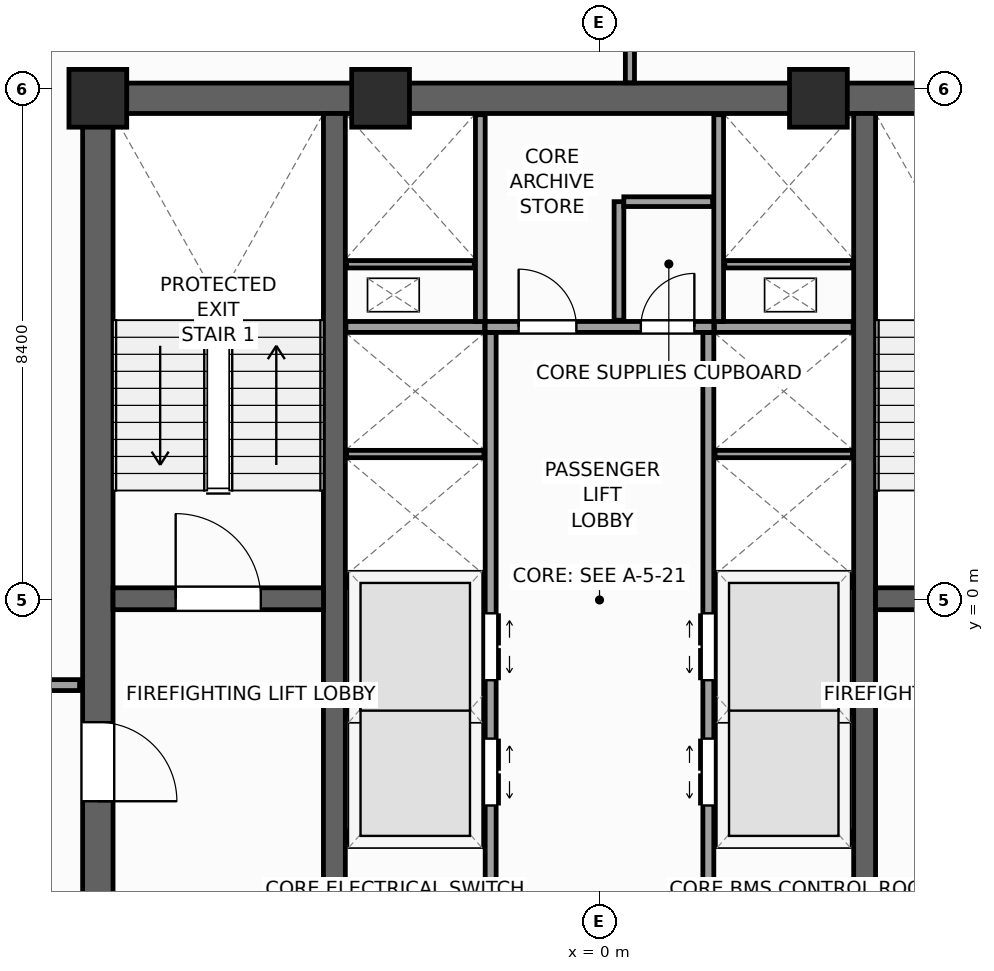
"""IFC4 building model, lengths in metres.
Left out: names, types, materials, properties, quantities, classifications, styles, units other than length and angle.
Written with IfcOpenShell. Run it as: python <this file> out.ifc"""

import sys

from ifc_helpers import new_model, si_unit, direction, frame, frame_2d, origin, origin_2d, place, context, subcontext, project, spatial, rectangle, extrude, source, transform, mapped, element, fill, save


model = new_model("IFC4")
c1 = context("Model", 3, precision=1e-05, world=origin(), true_north=direction((0.0, 1.0)))
c2 = subcontext(c1, "Body", "Model", "MODEL_VIEW")
j1 = project(units=[si_unit("LENGTHUNIT", "METRE"), si_unit("PLANEANGLEUNIT", "RADIAN")], contexts=[c1])
p1 = place(None, origin())
s1 = spatial("IfcSite", under=j1, at=p1, CompositionType="ELEMENT")
p2 = place(p1, origin())
s2 = spatial("IfcBuilding", under=s1, at=p2, CompositionType="ELEMENT")
p3 = place(p2, frame((0.0, 0.0, 213.4)))
s3 = spatial("IfcBuildingStorey", under=s2, at=p3, CompositionType="ELEMENT", Elevation=213.4)
p4 = place(p3, frame((-8.5, 8.25, 0.0), z_axis=(0.0, 0.0, 1.0), x_axis=(1.0, 0.0, 0.0)))
e1 = element("IfcWall", 1, at=p4, inside=s3, PredefinedType="SHEAR", context=c2, shape_type="SweptSolid", body=[
    extrude(rectangle(XDim=17.0, YDim=0.5, at=frame_2d((8.5, 0.0))), origin(), (0.0, 0.0, 1.0), 3.9),
])
p5 = place(p3, frame((-8.25, -8.0, 0.0), z_axis=(0.0, 0.0, 1.0), x_axis=(0.0, 1.0, 0.0)))
e2 = element("IfcWall", 2, at=p5, inside=s3, PredefinedType="SHEAR", context=c2, shape_type="SweptSolid", body=[
    extrude(rectangle(XDim=16.0, YDim=0.5, at=frame_2d((8.0, 0.0))), origin(), (0.0, 0.0, 1.0), 3.9),
])
p6 = place(p5, frame((4.69, 0.0, 0.0)))
e3 = element("IfcOpeningElement", 3, at=p6, cuts=e2, PredefinedType="OPENING", context=c2, shape_type="SweptSolid", body=[
    extrude(rectangle(XDim=1.3, YDim=2.2, at=frame_2d((0.65, 1.1))), frame((0.0, 0.26, 0.0), z_axis=(0.0, -1.0, 0.0), x_axis=(1.0, 0.0, 0.0)), (0.0, 0.0, 1.0), 0.52),
])
for number, where, z_axis, x_axis in (
    (4, (-4.36, -8.0, 0.0), (0.0, 0.0, 1.0), (0.0, 1.0, 0.0)),
    (5, (4.36, -8.0, 0.0), (0.0, 0.0, 1.0), (0.0, 1.0, 0.0)),
):
    element("IfcWall", number, at=place(p3, frame(where, z_axis=z_axis, x_axis=x_axis)), inside=s3, PredefinedType="SHEAR", context=c2, shape_type="SweptSolid", body=[
        extrude(rectangle(XDim=16.0, YDim=0.36, at=frame_2d((8.0, 0.0))), origin(), (0.0, 0.0, 1.0), 3.9),
    ])
p7 = place(p3, frame((-8.0, 0.02, 0.0), z_axis=(0.0, 0.0, 1.0), x_axis=(1.0, 0.0, 0.0)))
e6 = element("IfcWall", 6, at=p7, inside=s3, PredefinedType="SHEAR", context=c2, shape_type="SweptSolid", body=[
    extrude(rectangle(XDim=3.46, YDim=0.36, at=frame_2d((1.73, 0.0))), origin(), (0.0, 0.0, 1.0), 3.9),
])
p8 = place(p7, frame((1.03, 0.0, 0.0)))
e7 = element("IfcOpeningElement", 7, at=p8, cuts=e6, PredefinedType="OPENING", context=c2, shape_type="SweptSolid", body=[
    extrude(rectangle(XDim=1.4, YDim=2.2, at=frame_2d((0.7, 1.1))), frame((0.0, 0.19, 0.0), z_axis=(0.0, -1.0, 0.0), x_axis=(1.0, 0.0, 0.0)), (0.0, 0.0, 1.0), 0.38),
])
p9 = place(p3, frame((4.54, 0.02, 0.0), z_axis=(0.0, 0.0, 1.0), x_axis=(1.0, 0.0, 0.0)))
e8 = element("IfcWall", 8, at=p9, inside=s3, PredefinedType="SHEAR", context=c2, shape_type="SweptSolid", body=[
    extrude(rectangle(XDim=3.46, YDim=0.36, at=frame_2d((1.73, 0.0))), origin(), (0.0, 0.0, 1.0), 3.9),
])
p10 = place(p9, frame((1.03, 0.0, 0.0)))
e9 = element("IfcOpeningElement", 9, at=p10, cuts=e8, PredefinedType="OPENING", context=c2, shape_type="SweptSolid", body=[
    extrude(rectangle(XDim=1.4, YDim=2.2, at=frame_2d((0.7, 1.1))), frame((0.0, 0.19, 0.0), z_axis=(0.0, -1.0, 0.0), x_axis=(1.0, 0.0, 0.0)), (0.0, 0.0, 1.0), 0.38),
])
m1 = source(origin(), c2, "Body", "SweptSolid", [
    extrude(rectangle(XDim=0.95, YDim=0.95, at=origin_2d()), origin(), (0.0, 0.0, 1.0), 3.9),
])
for number, where, z_axis, x_axis in (
    (10, (-8.25, 8.25, 0.0), (0.0, 0.0, 1.0), (1.0, 0.0, 0.0)),
    (11, (-3.6, 8.25, 0.0), (0.0, 0.0, 1.0), (1.0, 0.0, 0.0)),
    (12, (3.6, 8.25, 0.0), (0.0, 0.0, 1.0), (1.0, 0.0, 0.0)),
):
    element("IfcColumn", number, at=place(p3, frame(where, z_axis=z_axis, x_axis=x_axis)), inside=s3, PredefinedType="PILASTER", context=c2, shape_type="MappedRepresentation", body=[
        mapped(m1, transform((0.0, 0.0, 0.0), scale=1.0)),
    ])
p11 = place(p3, frame((29.154, 6.733, 0.0), z_axis=(0.0, 0.0, 1.0), x_axis=(-0.77714192302, 0.629325378072, 0.0)))
e13 = element("IfcWall", 13, at=p11, inside=s3, PredefinedType="STANDARD", context=c2, shape_type="SweptSolid", body=[
    extrude(rectangle(XDim=36.84, YDim=0.34, at=frame_2d((18.42, 0.0))), origin(), (0.0, 0.0, 1.0), 2.96),
])
p12 = place(p11, frame((3.721, 0.0, 0.48)))
e14 = element("IfcOpeningElement", 14, at=p12, cuts=e13, PredefinedType="OPENING", context=c2, shape_type="SweptSolid", body=[
    extrude(rectangle(XDim=1.4, YDim=2.4, at=frame_2d((0.7, 1.2))), frame((0.0, 0.18, 0.0), z_axis=(0.0, -1.0, 0.0), x_axis=(1.0, 0.0, 0.0)), (0.0, 0.0, 1.0), 0.36),
])
p13 = place(p11, frame((9.809, 0.0, 0.58)))
e15 = element("IfcOpeningElement", 15, at=p13, cuts=e13, PredefinedType="OPENING", context=c2, shape_type="SweptSolid", body=[
    extrude(rectangle(XDim=1.75, YDim=2.3, at=frame_2d((0.875, 1.15))), frame((0.0, 0.18, 0.0), z_axis=(0.0, -1.0, 0.0), x_axis=(1.0, 0.0, 0.0)), (0.0, 0.0, 1.0), 0.36),
])
p14 = place(p11, frame((16.058, 0.0, 0.58)))
e16 = element("IfcOpeningElement", 16, at=p14, cuts=e13, PredefinedType="OPENING", context=c2, shape_type="SweptSolid", body=[
    extrude(rectangle(XDim=1.75, YDim=2.3, at=frame_2d((0.875, 1.15))), frame((0.0, 0.18, 0.0), z_axis=(0.0, -1.0, 0.0), x_axis=(1.0, 0.0, 0.0)), (0.0, 0.0, 1.0), 0.36),
])
p15 = place(p11, frame((24.176, 0.0, 0.58)))
e17 = element("IfcOpeningElement", 17, at=p15, cuts=e13, PredefinedType="OPENING", context=c2, shape_type="SweptSolid", body=[
    extrude(rectangle(XDim=1.75, YDim=2.3, at=frame_2d((0.875, 1.15))), frame((0.0, 0.18, 0.0), z_axis=(0.0, -1.0, 0.0), x_axis=(1.0, 0.0, 0.0)), (0.0, 0.0, 1.0), 0.36),
])
p16 = place(p11, frame((30.982, 0.0, 0.48)))
e18 = element("IfcOpeningElement", 18, at=p16, cuts=e13, PredefinedType="OPENING", context=c2, shape_type="SweptSolid", body=[
    extrude(rectangle(XDim=1.4, YDim=2.4, at=frame_2d((0.7, 1.2))), frame((0.0, 0.18, 0.0), z_axis=(0.0, -1.0, 0.0), x_axis=(1.0, 0.0, 0.0)), (0.0, 0.0, 1.0), 0.36),
])
p17 = place(p3, frame((-6.733, 29.154, 0.0), z_axis=(0.0, 0.0, 1.0), x_axis=(-0.629325378072, -0.77714192302, 0.0)))
e19 = element("IfcWall", 19, at=p17, inside=s3, PredefinedType="STANDARD", context=c2, shape_type="SweptSolid", body=[
    extrude(rectangle(XDim=36.84, YDim=0.34, at=frame_2d((18.42, 0.0))), origin(), (0.0, 0.0, 1.0), 2.96),
])
p18 = place(p17, frame((12.295, 0.0, 0.0)))
e20 = element("IfcOpeningElement", 20, at=p18, cuts=e19, PredefinedType="OPENING", context=c2, shape_type="SweptSolid", body=[
    extrude(rectangle(XDim=1.05, YDim=2.25, at=frame_2d((0.525, 1.125))), frame((0.0, 0.18, 0.0), z_axis=(0.0, -1.0, 0.0), x_axis=(1.0, 0.0, 0.0)), (0.0, 0.0, 1.0), 0.36),
])
p19 = place(p17, frame((3.721, 0.0, 0.48)))
e21 = element("IfcOpeningElement", 21, at=p19, cuts=e19, PredefinedType="OPENING", context=c2, shape_type="SweptSolid", body=[
    extrude(rectangle(XDim=1.4, YDim=2.4, at=frame_2d((0.7, 1.2))), frame((0.0, 0.18, 0.0), z_axis=(0.0, -1.0, 0.0), x_axis=(1.0, 0.0, 0.0)), (0.0, 0.0, 1.0), 0.36),
])
p20 = place(p17, frame((9.059, 0.0, 0.58)))
e22 = element("IfcOpeningElement", 22, at=p20, cuts=e19, PredefinedType="OPENING", context=c2, shape_type="SweptSolid", body=[
    extrude(rectangle(XDim=1.75, YDim=2.3, at=frame_2d((0.875, 1.15))), frame((0.0, 0.18, 0.0), z_axis=(0.0, -1.0, 0.0), x_axis=(1.0, 0.0, 0.0)), (0.0, 0.0, 1.0), 0.36),
])
p21 = place(p17, frame((16.058, 0.0, 0.58)))
e23 = element("IfcOpeningElement", 23, at=p21, cuts=e19, PredefinedType="OPENING", context=c2, shape_type="SweptSolid", body=[
    extrude(rectangle(XDim=1.75, YDim=2.3, at=frame_2d((0.875, 1.15))), frame((0.0, 0.18, 0.0), z_axis=(0.0, -1.0, 0.0), x_axis=(1.0, 0.0, 0.0)), (0.0, 0.0, 1.0), 0.36),
])
p22 = place(p17, frame((24.176, 0.0, 0.58)))
e24 = element("IfcOpeningElement", 24, at=p22, cuts=e19, PredefinedType="OPENING", context=c2, shape_type="SweptSolid", body=[
    extrude(rectangle(XDim=1.75, YDim=2.3, at=frame_2d((0.875, 1.15))), frame((0.0, 0.18, 0.0), z_axis=(0.0, -1.0, 0.0), x_axis=(1.0, 0.0, 0.0)), (0.0, 0.0, 1.0), 0.36),
])
p23 = place(p17, frame((30.982, 0.0, 0.48)))
e25 = element("IfcOpeningElement", 25, at=p23, cuts=e19, PredefinedType="OPENING", context=c2, shape_type="SweptSolid", body=[
    extrude(rectangle(XDim=1.4, YDim=2.4, at=frame_2d((0.7, 1.2))), frame((0.0, 0.18, 0.0), z_axis=(0.0, -1.0, 0.0), x_axis=(1.0, 0.0, 0.0)), (0.0, 0.0, 1.0), 0.36),
])
p24 = place(p3, frame((-1.79, -7.98, 0.0), z_axis=(0.0, 0.0, 1.0), x_axis=(0.0, 1.0, 0.0)))
e26 = element("IfcWall", 26, at=p24, inside=s3, PredefinedType="PARTITIONING", context=c2, shape_type="SweptSolid", body=[
    extrude(rectangle(XDim=12.38, YDim=0.18, at=frame_2d((6.19, 0.0))), origin(), (0.0, 0.0, 1.0), 3.66),
])
p25 = place(p24, frame((4.6, 0.0, 0.0)))
e27 = element("IfcOpeningElement", 27, at=p25, cuts=e26, PredefinedType="OPENING", context=c2, shape_type="SweptSolid", body=[
    extrude(rectangle(XDim=1.1, YDim=2.2, at=frame_2d((0.55, 1.1))), frame((0.0, 0.1, 0.0), z_axis=(0.0, -1.0, 0.0), x_axis=(1.0, 0.0, 0.0)), (0.0, 0.0, 1.0), 0.2),
])
p26 = place(p24, frame((6.66, 0.0, 0.0)))
e28 = element("IfcOpeningElement", 28, at=p26, cuts=e26, PredefinedType="OPENING", context=c2, shape_type="SweptSolid", body=[
    extrude(rectangle(XDim=1.1, YDim=2.2, at=frame_2d((0.55, 1.1))), frame((0.0, 0.1, 0.0), z_axis=(0.0, -1.0, 0.0), x_axis=(1.0, 0.0, 0.0)), (0.0, 0.0, 1.0), 0.2),
])
p27 = place(p24, frame((1.4, 0.0, 0.0)))
e29 = element("IfcOpeningElement", 29, at=p27, cuts=e26, PredefinedType="OPENING", context=c2, shape_type="SweptSolid", body=[
    extrude(rectangle(XDim=1.15, YDim=2.25, at=frame_2d((0.575, 1.125))), frame((0.0, 0.1, 0.0), z_axis=(0.0, -1.0, 0.0), x_axis=(1.0, 0.0, 0.0)), (0.0, 0.0, 1.0), 0.2),
])
p28 = place(p3, frame((1.79, -7.98, 0.0), z_axis=(0.0, 0.0, 1.0), x_axis=(0.0, 1.0, 0.0)))
e30 = element("IfcWall", 30, at=p28, inside=s3, PredefinedType="PARTITIONING", context=c2, shape_type="SweptSolid", body=[
    extrude(rectangle(XDim=12.38, YDim=0.18, at=frame_2d((6.19, 0.0))), origin(), (0.0, 0.0, 1.0), 3.66),
])
p29 = place(p28, frame((4.6, 0.0, 0.0)))
e31 = element("IfcOpeningElement", 31, at=p29, cuts=e30, PredefinedType="OPENING", context=c2, shape_type="SweptSolid", body=[
    extrude(rectangle(XDim=1.1, YDim=2.2, at=frame_2d((0.55, 1.1))), frame((0.0, 0.1, 0.0), z_axis=(0.0, -1.0, 0.0), x_axis=(1.0, 0.0, 0.0)), (0.0, 0.0, 1.0), 0.2),
])
p30 = place(p28, frame((6.66, 0.0, 0.0)))
e32 = element("IfcOpeningElement", 32, at=p30, cuts=e30, PredefinedType="OPENING", context=c2, shape_type="SweptSolid", body=[
    extrude(rectangle(XDim=1.1, YDim=2.2, at=frame_2d((0.55, 1.1))), frame((0.0, 0.1, 0.0), z_axis=(0.0, -1.0, 0.0), x_axis=(1.0, 0.0, 0.0)), (0.0, 0.0, 1.0), 0.2),
])
p31 = place(p28, frame((1.4, 0.0, 0.0)))
e33 = element("IfcOpeningElement", 33, at=p31, cuts=e30, PredefinedType="OPENING", context=c2, shape_type="SweptSolid", body=[
    extrude(rectangle(XDim=1.15, YDim=2.25, at=frame_2d((0.575, 1.125))), frame((0.0, 0.1, 0.0), z_axis=(0.0, -1.0, 0.0), x_axis=(1.0, 0.0, 0.0)), (0.0, 0.0, 1.0), 0.2),
])
p32 = place(p3, frame((-1.88, 4.49, 0.0), z_axis=(0.0, 0.0, 1.0), x_axis=(1.0, 0.0, 0.0)))
e34 = element("IfcWall", 34, at=p32, inside=s3, PredefinedType="PARTITIONING", context=c2, shape_type="SweptSolid", body=[
    extrude(rectangle(XDim=3.76, YDim=0.18, at=frame_2d((1.88, 0.0))), origin(), (0.0, 0.0, 1.0), 3.66),
])
p33 = place(p32, frame((0.55, 0.0, 0.0)))
e35 = element("IfcOpeningElement", 35, at=p33, cuts=e34, PredefinedType="OPENING", context=c2, shape_type="SweptSolid", body=[
    extrude(rectangle(XDim=0.95, YDim=2.1, at=frame_2d((0.475, 1.05))), frame((0.0, 0.1, 0.0), z_axis=(0.0, -1.0, 0.0), x_axis=(1.0, 0.0, 0.0)), (0.0, 0.0, 1.0), 0.2),
])
p34 = place(p32, frame((2.56, 0.0, 0.0)))
e36 = element("IfcOpeningElement", 36, at=p34, cuts=e34, PredefinedType="OPENING", context=c2, shape_type="SweptSolid", body=[
    extrude(rectangle(XDim=0.88, YDim=2.1, at=frame_2d((0.44, 1.05))), frame((0.0, 0.1, 0.0), z_axis=(0.0, -1.0, 0.0), x_axis=(1.0, 0.0, 0.0)), (0.0, 0.0, 1.0), 0.2),
])
for number, where, z_axis, x_axis in (
    (37, (-4.17, -3.9, 0.0), (0.0, 0.0, 1.0), (1.0, 0.0, 0.0)),
    (38, (1.89, -3.9, 0.0), (0.0, 0.0, 1.0), (1.0, 0.0, 0.0)),
    (39, (-4.17, 0.3, 0.0), (0.0, 0.0, 1.0), (1.0, 0.0, 0.0)),
    (40, (1.89, 0.3, 0.0), (0.0, 0.0, 1.0), (1.0, 0.0, 0.0)),
    (41, (-4.17, 4.49, 0.0), (0.0, 0.0, 1.0), (1.0, 0.0, 0.0)),
    (42, (1.89, 4.49, 0.0), (0.0, 0.0, 1.0), (1.0, 0.0, 0.0)),
):
    element("IfcWall", number, at=place(p3, frame(where, z_axis=z_axis, x_axis=x_axis)), inside=s3, PredefinedType="PARTITIONING", context=c2, shape_type="SweptSolid", body=[
        extrude(rectangle(XDim=2.28, YDim=0.18, at=frame_2d((1.14, 0.0))), origin(), (0.0, 0.0, 1.0), 3.66),
    ])
for number, where, z_axis, x_axis in (
    (43, (-4.16, -1.8, 0.0), (0.0, 0.0, 1.0), (1.0, 0.0, 0.0)),
    (44, (1.9, -1.8, 0.0), (0.0, 0.0, 1.0), (1.0, 0.0, 0.0)),
    (45, (-4.16, 2.4, 0.0), (0.0, 0.0, 1.0), (1.0, 0.0, 0.0)),
    (46, (1.9, 2.4, 0.0), (0.0, 0.0, 1.0), (1.0, 0.0, 0.0)),
):
    element("IfcWall", number, at=place(p3, frame(where, z_axis=z_axis, x_axis=x_axis)), inside=s3, PredefinedType="PARTITIONING", context=c2, shape_type="SweptSolid", body=[
        extrude(rectangle(XDim=2.26, YDim=0.12, at=frame_2d((1.13, 0.0))), origin(), (0.0, 0.0, 1.0), 3.66),
    ])
for number, where, z_axis, x_axis in (
    (47, (-1.96, 4.58, 0.0), (0.0, 0.0, 1.0), (0.0, 1.0, 0.0)),
    (48, (1.96, 4.58, 0.0), (0.0, 0.0, 1.0), (0.0, 1.0, 0.0)),
):
    element("IfcWall", number, at=place(p3, frame(where, z_axis=z_axis, x_axis=x_axis)), inside=s3, PredefinedType="PARTITIONING", context=c2, shape_type="SweptSolid", body=[
        extrude(rectangle(XDim=3.4, YDim=0.16, at=frame_2d((1.7, 0.0))), origin(), (0.0, 0.0, 1.0), 3.66),
    ])
for number, where, z_axis, x_axis in (
    (49, (-4.16, 5.52, 0.0), (0.0, 0.0, 1.0), (1.0, 0.0, 0.0)),
    (50, (2.06, 5.52, 0.0), (0.0, 0.0, 1.0), (1.0, 0.0, 0.0)),
):
    element("IfcWall", number, at=place(p3, frame(where, z_axis=z_axis, x_axis=x_axis)), inside=s3, PredefinedType="PARTITIONING", context=c2, shape_type="SweptSolid", body=[
        extrude(rectangle(XDim=2.1, YDim=0.12, at=frame_2d((1.05, 0.0))), origin(), (0.0, 0.0, 1.0), 3.66),
    ])
p35 = place(p3, frame((0.32, 4.6, 0.0), z_axis=(0.0, 0.0, 1.0), x_axis=(0.0, 1.0, 0.0)))
e51 = element("IfcWall", 51, at=p35, inside=s3, PredefinedType="PARTITIONING", context=c2, shape_type="SweptSolid", body=[
    extrude(rectangle(XDim=1.95, YDim=0.16, at=frame_2d((0.975, 0.0))), origin(), (0.0, 0.0, 1.0), 3.66),
])
p36 = place(p3, frame((0.4, 6.55, 0.0), z_axis=(0.0, 0.0, 1.0), x_axis=(1.0, 0.0, 0.0)))
e52 = element("IfcWall", 52, at=p36, inside=s3, PredefinedType="PARTITIONING", context=c2, shape_type="SweptSolid", body=[
    extrude(rectangle(XDim=1.46, YDim=0.16, at=frame_2d((0.73, 0.0))), origin(), (0.0, 0.0, 1.0), 3.66),
])
p37 = place(p3, frame((-11.45, -1.4, 0.0), z_axis=(0.0, 0.0, 1.0), x_axis=(1.0, 0.0, 0.0)))
e53 = element("IfcWall", 53, at=p37, inside=s3, PredefinedType="PARTITIONING", context=c2, shape_type="SweptSolid", body=[
    extrude(rectangle(XDim=2.9, YDim=0.18, at=frame_2d((1.45, 0.0))), origin(), (0.0, 0.0, 1.0), 3.66),
])
p38 = place(p37, frame((0.9, 0.0, 0.0)))
e54 = element("IfcOpeningElement", 54, at=p38, cuts=e53, PredefinedType="OPENING", context=c2, shape_type="SweptSolid", body=[
    extrude(rectangle(XDim=1.1, YDim=2.2, at=frame_2d((0.55, 1.1))), frame((0.0, 0.1, 0.0), z_axis=(0.0, -1.0, 0.0), x_axis=(1.0, 0.0, 0.0)), (0.0, 0.0, 1.0), 0.2),
])
p39 = place(p3, frame((0.5, 8.505, 0.0), z_axis=(0.0, 0.0, 1.0), x_axis=(0.0, 1.0, 0.0)))
e55 = element("IfcWall", 55, at=p39, inside=s3, PredefinedType="PARTITIONING", context=c2, shape_type="SweptSolid", body=[
    extrude(rectangle(XDim=20.675, YDim=0.15, at=frame_2d((10.337, 0.0))), origin(), (0.0, 0.0, 1.0), 3.66),
])
m2 = source(origin(), c2, "Body", "SweptSolid", [
    extrude(rectangle(XDim=1.4, YDim=2.2, at=frame_2d((0.7, 1.1))), frame((0.0, 0.025, 0.0), z_axis=(0.0, -1.0, 0.0), x_axis=(1.0, 0.0, 0.0)), (0.0, 0.0, 1.0), 0.05),
])
p40 = place(p8, origin())
e56 = element("IfcDoor", 56, at=p40, inside=s3, OperationType="SINGLE_SWING_LEFT", PredefinedType="DOOR", context=c2, shape_type="MappedRepresentation", body=[
    mapped(m2, transform((0.0, 0.0, 0.0), scale=1.0)),
])
fill(e7, e56)
m3 = source(origin(), c2, "Body", "SweptSolid", [
    extrude(rectangle(XDim=1.3, YDim=2.2, at=frame_2d((0.65, 1.1))), frame((0.0, 0.025, 0.0), z_axis=(0.0, -1.0, 0.0), x_axis=(1.0, 0.0, 0.0)), (0.0, 0.0, 1.0), 0.05),
])
p41 = place(p6, frame((1.3, 0.0, 0.0), z_axis=(0.0, 0.0, 1.0), x_axis=(-1.0, 0.0, 0.0)))
e57 = element("IfcDoor", 57, at=p41, inside=s3, OperationType="SINGLE_SWING_LEFT", PredefinedType="DOOR", context=c2, shape_type="MappedRepresentation", body=[
    mapped(m3, transform((0.0, 0.0, 0.0), scale=1.0)),
])
fill(e3, e57)
m4 = source(origin(), c2, "Body", "SweptSolid", [
    extrude(rectangle(XDim=1.1, YDim=2.2, at=frame_2d((0.55, 1.1))), frame((0.0, 0.025, 0.0), z_axis=(0.0, -1.0, 0.0), x_axis=(1.0, 0.0, 0.0)), (0.0, 0.0, 1.0), 0.05),
])
p42 = place(p25, frame((1.1, 0.0, 0.0), z_axis=(0.0, 0.0, 1.0), x_axis=(-1.0, 0.0, 0.0)))
e58 = element("IfcDoor", 58, at=p42, inside=s3, OperationType="DOUBLE_DOOR_SLIDING", PredefinedType="DOOR", context=c2, shape_type="MappedRepresentation", body=[
    mapped(m4, transform((0.0, 0.0, 0.0), scale=1.0)),
])
fill(e27, e58)
p43 = place(p26, frame((1.1, 0.0, 0.0), z_axis=(0.0, 0.0, 1.0), x_axis=(-1.0, 0.0, 0.0)))
e59 = element("IfcDoor", 59, at=p43, inside=s3, OperationType="DOUBLE_DOOR_SLIDING", PredefinedType="DOOR", context=c2, shape_type="MappedRepresentation", body=[
    mapped(m4, transform((0.0, 0.0, 0.0), scale=1.0)),
])
fill(e28, e59)
p44 = place(p29, origin())
e60 = element("IfcDoor", 60, at=p44, inside=s3, OperationType="DOUBLE_DOOR_SLIDING", PredefinedType="DOOR", context=c2, shape_type="MappedRepresentation", body=[
    mapped(m4, transform((0.0, 0.0, 0.0), scale=1.0)),
])
fill(e31, e60)
p45 = place(p30, origin())
e61 = element("IfcDoor", 61, at=p45, inside=s3, OperationType="DOUBLE_DOOR_SLIDING", PredefinedType="DOOR", context=c2, shape_type="MappedRepresentation", body=[
    mapped(m4, transform((0.0, 0.0, 0.0), scale=1.0)),
])
fill(e32, e61)
m5 = source(origin(), c2, "Body", "SweptSolid", [
    extrude(rectangle(XDim=0.95, YDim=2.1, at=frame_2d((0.475, 1.05))), frame((0.0, 0.025, 0.0), z_axis=(0.0, -1.0, 0.0), x_axis=(1.0, 0.0, 0.0)), (0.0, 0.0, 1.0), 0.05),
])
p46 = place(p33, origin())
e62 = element("IfcDoor", 62, at=p46, inside=s3, OperationType="SINGLE_SWING_LEFT", PredefinedType="DOOR", context=c2, shape_type="MappedRepresentation", body=[
    mapped(m5, transform((0.0, 0.0, 0.0), scale=1.0)),
])
fill(e35, e62)
m6 = source(origin(), c2, "Body", "SweptSolid", [
    extrude(rectangle(XDim=0.88, YDim=2.1, at=frame_2d((0.44, 1.05))), frame((0.0, 0.025, 0.0), z_axis=(0.0, -1.0, 0.0), x_axis=(1.0, 0.0, 0.0)), (0.0, 0.0, 1.0), 0.05),
])
p47 = place(p34, origin())
e63 = element("IfcDoor", 63, at=p47, inside=s3, OperationType="SINGLE_SWING_RIGHT", PredefinedType="DOOR", context=c2, shape_type="MappedRepresentation", body=[
    mapped(m6, transform((0.0, 0.0, 0.0), scale=1.0)),
])
fill(e36, e63)
save(model, sys.argv[1])
